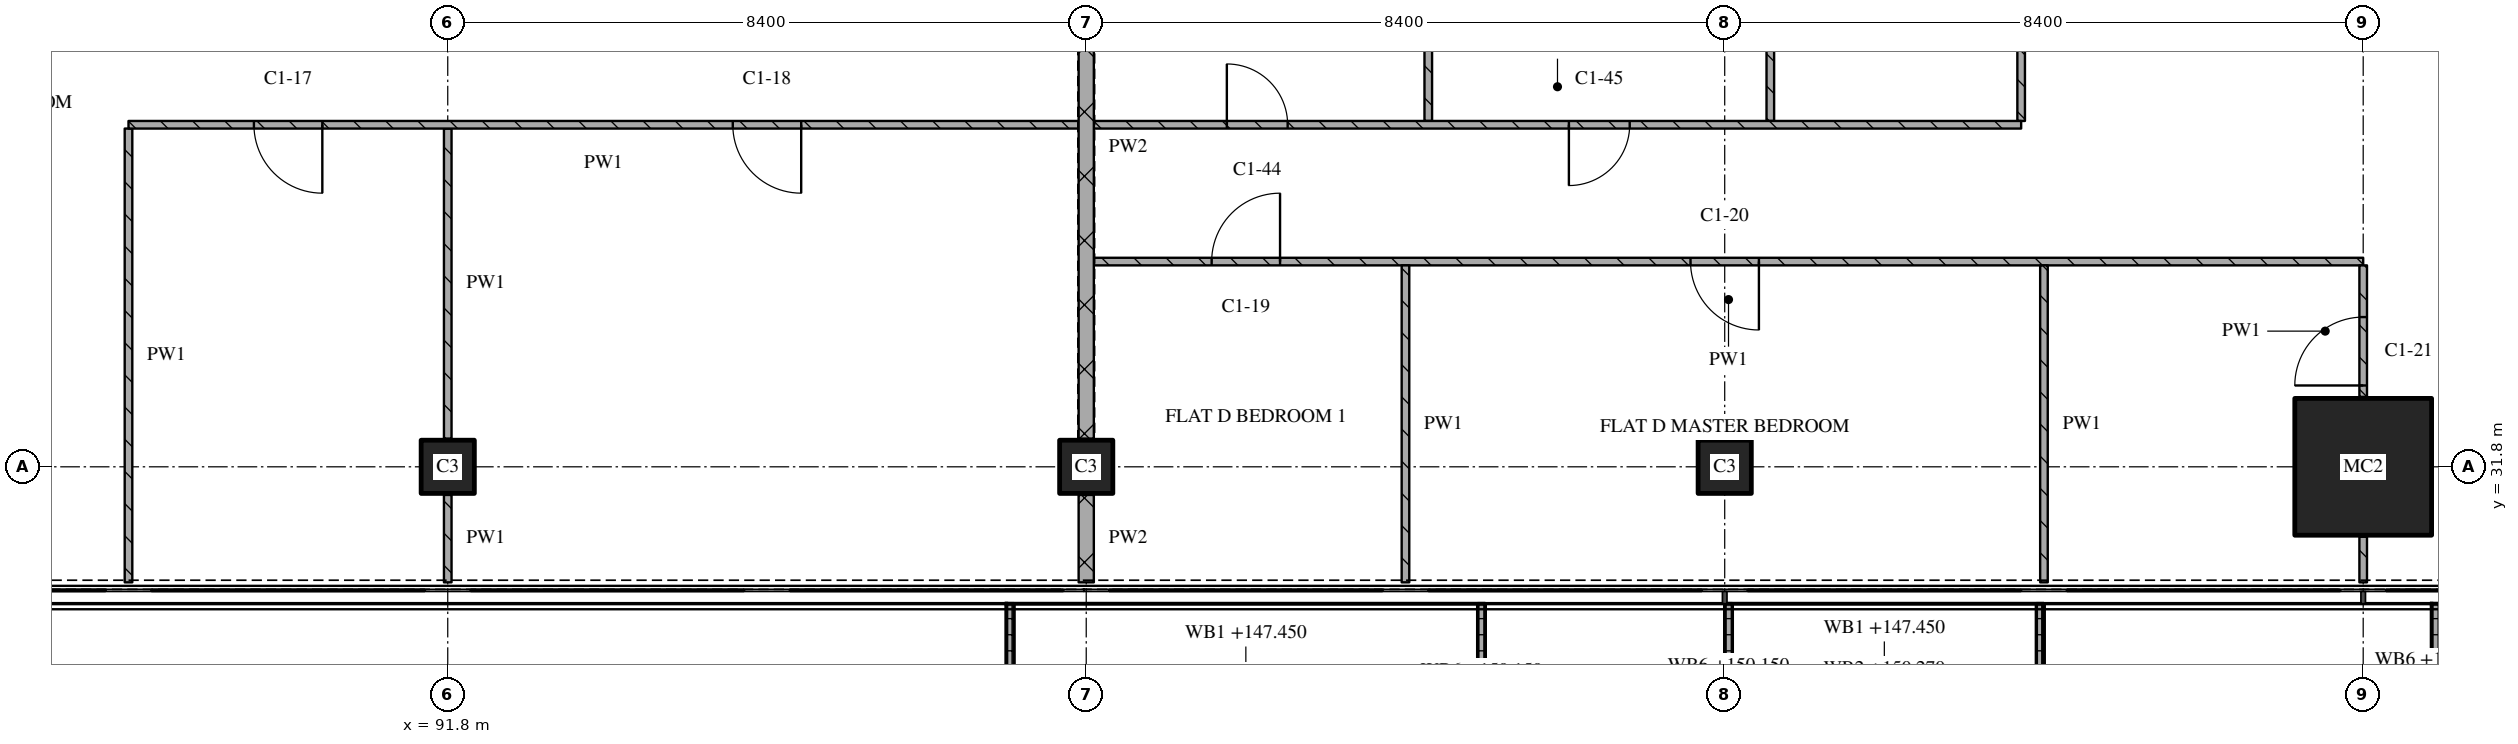
"""IFC4 building model, lengths in metres.
Left out: names, types, materials, properties, quantities, classifications, styles, units other than length and angle.
Written with IfcOpenShell. Run it as: python <this file> out.ifc"""

import sys

from ifc_helpers import new_model, si_unit, direction, frame, frame_2d, origin, origin_2d, place, context, subcontext, project, spatial, polyline, rectangle, outline, extrude, element, fill, save


model = new_model("IFC4")
c1 = context("Model", 3, precision=1e-05, world=origin(), true_north=direction((0.0, 1.0)))
c2 = subcontext(c1, "Body", "Model", "MODEL_VIEW")
j1 = project(units=[si_unit("LENGTHUNIT", "METRE"), si_unit("PLANEANGLEUNIT", "RADIAN")], contexts=[c1])
p1 = place(None, origin())
s1 = spatial("IfcSite", under=j1, at=p1, CompositionType="ELEMENT")
p2 = place(p1, origin())
s2 = spatial("IfcBuilding", under=s1, at=p2, CompositionType="ELEMENT")
p3 = place(p2, frame((0.0, 0.0, 147.45)))
s3 = spatial("IfcBuildingStorey", under=s2, at=p3, CompositionType="ELEMENT", Elevation=147.45)
for number, where, z_axis, x_axis in (
    (1, (91.8, 31.8, 0.0), (0.0, 0.0, 1.0), (1.0, 0.0, 0.0)),
    (2, (100.2, 31.8, 0.0), (0.0, 0.0, 1.0), (1.0, 0.0, 0.0)),
    (3, (108.6, 31.8, 0.0), (0.0, 0.0, 1.0), (1.0, 0.0, 0.0)),
):
    element("IfcColumn", number, at=place(p3, frame(where, z_axis=z_axis, x_axis=x_axis)), inside=s3, PredefinedType="COLUMN", context=c2, shape_type="SweptSolid", body=[
        extrude(rectangle(XDim=0.7, YDim=0.7, at=origin_2d()), origin(), (0.0, 0.0, 1.0), 3.6),
    ])
p4 = place(p3, frame((117.0, 31.8, 0.0), z_axis=(0.0, 0.0, 1.0), x_axis=(1.0, 0.0, 0.0)))
e4 = element("IfcColumn", 4, at=p4, inside=s3, PredefinedType="COLUMN", context=c2, shape_type="SweptSolid", body=[
    extrude(rectangle(XDim=1.8, YDim=1.8, at=origin_2d()), origin(), (0.0, 0.0, 1.0), 3.6),
])
p5 = place(p3, origin())
e5 = element("IfcWall", 5, at=p5, inside=s3, PredefinedType="SOLIDWALL", context=c2, shape_type="SweptSolid", body=[
    extrude(outline(polyline([(99.15, 30.0), (99.25, 30.0), (99.25, 28.233), (105.35, 28.233), (105.35, 30.0), (105.45, 30.0), (105.45, 28.133), (99.15, 28.133), (99.15, 30.0)])), origin(), (0.0, 0.0, 1.0), 1.0),
])
p6 = place(p3, origin())
e6 = element("IfcWall", 6, at=p6, inside=s3, PredefinedType="SOLIDWALL", context=c2, shape_type="SweptSolid", body=[
    extrude(outline(polyline([(108.6, 30.0), (108.7, 30.0), (108.7, 28.367), (112.7, 28.367), (112.7, 30.0), (112.8, 30.0), (112.8, 28.267), (108.6, 28.267), (108.6, 30.0)])), origin(), (0.0, 0.0, 1.0), 1.0),
])
p7 = place(p3, origin())
e7 = element("IfcWall", 7, at=p7, inside=s3, PredefinedType="SOLIDWALL", context=c2, shape_type="SweptSolid", body=[
    extrude(outline(polyline([(117.9, 30.0), (118.0, 30.0), (118.0, 28.5), (120.2, 28.5), (120.2, 30.0), (120.3, 30.0), (120.3, 28.4), (117.9, 28.4), (117.9, 30.0)])), origin(), (0.0, 0.0, 1.0), 1.0),
])
p8 = place(p3, frame((117.0, 34.5, 0.0), z_axis=(0.0, 0.0, 1.0), x_axis=(-1.0, 0.0, 0.0)))
e8 = element("IfcWall", 8, at=p8, inside=s3, PredefinedType="PARTITIONING", context=c2, shape_type="SweptSolid", body=[
    extrude(rectangle(XDim=16.7, YDim=0.1, at=frame_2d((8.35, 0.0))), origin(), (0.0, 0.0, 1.0), 3.32),
])
p9 = place(p8, frame((7.95, 0.0, 0.0)))
e9 = element("IfcOpeningElement", 9, at=p9, cuts=e8, PredefinedType="OPENING", context=c2, shape_type="SweptSolid", body=[
    extrude(rectangle(XDim=0.9, YDim=2.1, at=frame_2d((0.45, 1.05))), frame((0.0, 0.06, 0.0), z_axis=(0.0, -1.0, 0.0), x_axis=(1.0, 0.0, 0.0)), (0.0, 0.0, 1.0), 0.12),
])
p10 = place(p8, frame((14.25, 0.0, 0.0)))
e10 = element("IfcOpeningElement", 10, at=p10, cuts=e8, PredefinedType="OPENING", context=c2, shape_type="SweptSolid", body=[
    extrude(rectangle(XDim=0.9, YDim=2.1, at=frame_2d((0.45, 1.05))), frame((0.0, 0.06, 0.0), z_axis=(0.0, -1.0, 0.0), x_axis=(1.0, 0.0, 0.0)), (0.0, 0.0, 1.0), 0.12),
])
p11 = place(p3, frame((87.6, 36.25, 0.0), z_axis=(0.0, 0.0, 1.0), x_axis=(0.0, -1.0, 0.0)))
e11 = element("IfcWall", 11, at=p11, inside=s3, PredefinedType="PARTITIONING", context=c2, shape_type="SweptSolid", body=[
    extrude(rectangle(XDim=5.97, YDim=0.1, at=frame_2d((2.985, 0.0))), origin(), (0.0, 0.0, 1.0), 3.32),
])
p12 = place(p3, frame((91.8, 31.43, 0.0), z_axis=(0.0, 0.0, 1.0), x_axis=(0.0, -1.0, 0.0)))
e12 = element("IfcWall", 12, at=p12, inside=s3, PredefinedType="PARTITIONING", context=c2, shape_type="SweptSolid", body=[
    extrude(rectangle(XDim=1.15, YDim=0.1, at=frame_2d((0.575, 0.0))), origin(), (0.0, 0.0, 1.0), 3.32),
])
p13 = place(p3, frame((91.8, 36.25, 0.0), z_axis=(0.0, 0.0, 1.0), x_axis=(0.0, -1.0, 0.0)))
e13 = element("IfcWall", 13, at=p13, inside=s3, PredefinedType="PARTITIONING", context=c2, shape_type="SweptSolid", body=[
    extrude(rectangle(XDim=4.08, YDim=0.1, at=frame_2d((2.04, 0.0))), origin(), (0.0, 0.0, 1.0), 3.32),
])
p14 = place(p3, frame((100.2, 31.43, 0.0), z_axis=(0.0, 0.0, 1.0), x_axis=(0.0, -1.0, 0.0)))
e14 = element("IfcWall", 14, at=p14, inside=s3, PredefinedType="PARTITIONING", context=c2, shape_type="SweptSolid", body=[
    extrude(rectangle(XDim=1.15, YDim=0.2, at=frame_2d((0.575, 0.0))), origin(), (0.0, 0.0, 1.0), 3.32),
])
p15 = place(p3, frame((100.2, 39.83, 0.0), z_axis=(0.0, 0.0, 1.0), x_axis=(0.0, -1.0, 0.0)))
e15 = element("IfcWall", 15, at=p15, inside=s3, PredefinedType="PARTITIONING", context=c2, shape_type="SweptSolid", body=[
    extrude(rectangle(XDim=7.66, YDim=0.2, at=frame_2d((3.83, 0.0))), origin(), (0.0, 0.0, 1.0), 2.72),
])
p16 = place(p3, frame((104.4, 34.45, 0.0), z_axis=(0.0, 0.0, 1.0), x_axis=(0.0, -1.0, 0.0)))
e16 = element("IfcWall", 16, at=p16, inside=s3, PredefinedType="PARTITIONING", context=c2, shape_type="SweptSolid", body=[
    extrude(rectangle(XDim=4.17, YDim=0.1, at=frame_2d((2.085, 0.0))), origin(), (0.0, 0.0, 1.0), 3.32),
])
for number, where, z_axis, x_axis in (
    (17, (104.7, 40.7, 0.0), (0.0, 0.0, 1.0), (0.0, -1.0, 0.0)),
    (18, (109.2, 40.7, 0.0), (0.0, 0.0, 1.0), (0.0, -1.0, 0.0)),
):
    element("IfcWall", number, at=place(p3, frame(where, z_axis=z_axis, x_axis=x_axis)), inside=s3, PredefinedType="PARTITIONING", context=c2, shape_type="SweptSolid", body=[
        extrude(rectangle(XDim=4.35, YDim=0.1, at=frame_2d((2.175, 0.0))), origin(), (0.0, 0.0, 1.0), 3.32),
    ])
p17 = place(p3, frame((112.5, 36.35, 0.0), z_axis=(0.0, 0.0, 1.0), x_axis=(0.0, 1.0, 0.0)))
e19 = element("IfcWall", 19, at=p17, inside=s3, PredefinedType="PARTITIONING", context=c2, shape_type="SweptSolid", body=[
    extrude(rectangle(XDim=4.35, YDim=0.1, at=frame_2d((2.175, 0.0))), origin(), (0.0, 0.0, 1.0), 3.32),
])
p18 = place(p17, frame((1.75, 0.0, 0.0)))
e20 = element("IfcOpeningElement", 20, at=p18, cuts=e19, PredefinedType="OPENING", context=c2, shape_type="SweptSolid", body=[
    extrude(rectangle(XDim=0.9, YDim=2.1, at=frame_2d((0.45, 1.05))), frame((0.0, 0.06, 0.0), z_axis=(0.0, -1.0, 0.0), x_axis=(1.0, 0.0, 0.0)), (0.0, 0.0, 1.0), 0.12),
])
p19 = place(p3, frame((112.8, 34.45, 0.0), z_axis=(0.0, 0.0, 1.0), x_axis=(0.0, -1.0, 0.0)))
e21 = element("IfcWall", 21, at=p19, inside=s3, PredefinedType="PARTITIONING", context=c2, shape_type="SweptSolid", body=[
    extrude(rectangle(XDim=4.17, YDim=0.1, at=frame_2d((2.085, 0.0))), origin(), (0.0, 0.0, 1.0), 3.32),
])
p20 = place(p3, frame((117.0, 30.88, 0.0), z_axis=(0.0, 0.0, 1.0), x_axis=(0.0, -1.0, 0.0)))
e22 = element("IfcWall", 22, at=p20, inside=s3, PredefinedType="PARTITIONING", context=c2, shape_type="SweptSolid", body=[
    extrude(rectangle(XDim=0.6, YDim=0.1, at=frame_2d((0.3, 0.0))), origin(), (0.0, 0.0, 1.0), 3.32),
])
p21 = place(p3, frame((117.0, 32.72, 0.0), z_axis=(0.0, 0.0, 1.0), x_axis=(0.0, 1.0, 0.0)))
e23 = element("IfcWall", 23, at=p21, inside=s3, PredefinedType="PARTITIONING", context=c2, shape_type="SweptSolid", body=[
    extrude(rectangle(XDim=1.73, YDim=0.1, at=frame_2d((0.865, 0.0))), origin(), (0.0, 0.0, 1.0), 3.32),
])
p22 = place(p21, frame((0.15, 0.0, 0.0)))
e24 = element("IfcOpeningElement", 24, at=p22, cuts=e23, PredefinedType="OPENING", context=c2, shape_type="SweptSolid", body=[
    extrude(rectangle(XDim=0.9, YDim=2.1, at=frame_2d((0.45, 1.05))), frame((0.0, 0.06, 0.0), z_axis=(0.0, -1.0, 0.0), x_axis=(1.0, 0.0, 0.0)), (0.0, 0.0, 1.0), 0.12),
])
p23 = place(p3, frame((100.1, 36.3, 0.0), z_axis=(0.0, 0.0, 1.0), x_axis=(-1.0, 0.0, 0.0)))
e25 = element("IfcWall", 25, at=p23, inside=s3, PredefinedType="PARTITIONING", context=c2, shape_type="SweptSolid", body=[
    extrude(rectangle(XDim=12.5, YDim=0.1, at=frame_2d((6.25, 0.0))), origin(), (0.0, 0.0, 1.0), 3.32),
])
p24 = place(p23, frame((3.65, 0.0, 0.0)))
e26 = element("IfcOpeningElement", 26, at=p24, cuts=e25, PredefinedType="OPENING", context=c2, shape_type="SweptSolid", body=[
    extrude(rectangle(XDim=0.9, YDim=2.1, at=frame_2d((0.45, 1.05))), frame((0.0, 0.06, 0.0), z_axis=(0.0, -1.0, 0.0), x_axis=(1.0, 0.0, 0.0)), (0.0, 0.0, 1.0), 0.12),
])
p25 = place(p23, frame((9.95, 0.0, 0.0)))
e27 = element("IfcOpeningElement", 27, at=p25, cuts=e25, PredefinedType="OPENING", context=c2, shape_type="SweptSolid", body=[
    extrude(rectangle(XDim=0.9, YDim=2.1, at=frame_2d((0.45, 1.05))), frame((0.0, 0.06, 0.0), z_axis=(0.0, -1.0, 0.0), x_axis=(1.0, 0.0, 0.0)), (0.0, 0.0, 1.0), 0.12),
])
p26 = place(p3, frame((100.3, 36.3, 0.0), z_axis=(0.0, 0.0, 1.0), x_axis=(1.0, 0.0, 0.0)))
e28 = element("IfcWall", 28, at=p26, inside=s3, PredefinedType="PARTITIONING", context=c2, shape_type="SweptSolid", body=[
    extrude(rectangle(XDim=12.2, YDim=0.1, at=frame_2d((6.1, 0.0))), origin(), (0.0, 0.0, 1.0), 3.32),
])
p27 = place(p26, frame((1.75, 0.0, 0.0)))
e29 = element("IfcOpeningElement", 29, at=p27, cuts=e28, PredefinedType="OPENING", context=c2, shape_type="SweptSolid", body=[
    extrude(rectangle(XDim=0.8, YDim=2.1, at=frame_2d((0.4, 1.05))), frame((0.0, 0.06, 0.0), z_axis=(0.0, -1.0, 0.0), x_axis=(1.0, 0.0, 0.0)), (0.0, 0.0, 1.0), 0.12),
])
p28 = place(p26, frame((6.25, 0.0, 0.0)))
e30 = element("IfcOpeningElement", 30, at=p28, cuts=e28, PredefinedType="OPENING", context=c2, shape_type="SweptSolid", body=[
    extrude(rectangle(XDim=0.8, YDim=2.1, at=frame_2d((0.4, 1.05))), frame((0.0, 0.06, 0.0), z_axis=(0.0, -1.0, 0.0), x_axis=(1.0, 0.0, 0.0)), (0.0, 0.0, 1.0), 0.12),
])
p29 = place(p9, origin())
e31 = element("IfcDoor", 31, at=p29, inside=s3, OperationType="SINGLE_SWING_LEFT", PredefinedType="DOOR", context=c2, shape_type="SweptSolid", body=[
    extrude(rectangle(XDim=0.9, YDim=2.1, at=frame_2d((0.45, 1.05))), frame((0.0, 0.025, 0.0), z_axis=(0.0, -1.0, 0.0), x_axis=(1.0, 0.0, 0.0)), (0.0, 0.0, 1.0), 0.05),
])
fill(e9, e31)
p30 = place(p10, origin())
e32 = element("IfcDoor", 32, at=p30, inside=s3, OperationType="SINGLE_SWING_RIGHT", PredefinedType="DOOR", context=c2, shape_type="SweptSolid", body=[
    extrude(rectangle(XDim=0.9, YDim=2.1, at=frame_2d((0.45, 1.05))), frame((0.0, 0.025, 0.0), z_axis=(0.0, -1.0, 0.0), x_axis=(1.0, 0.0, 0.0)), (0.0, 0.0, 1.0), 0.05),
])
fill(e10, e32)
p31 = place(p22, origin())
e33 = element("IfcDoor", 33, at=p31, inside=s3, OperationType="SINGLE_SWING_LEFT", PredefinedType="DOOR", context=c2, shape_type="SweptSolid", body=[
    extrude(rectangle(XDim=0.9, YDim=2.1, at=frame_2d((0.45, 1.05))), frame((0.0, 0.025, 0.0), z_axis=(0.0, -1.0, 0.0), x_axis=(1.0, 0.0, 0.0)), (0.0, 0.0, 1.0), 0.05),
])
fill(e24, e33)
p32 = place(p24, origin())
e34 = element("IfcDoor", 34, at=p32, inside=s3, OperationType="SINGLE_SWING_LEFT", PredefinedType="DOOR", context=c2, shape_type="SweptSolid", body=[
    extrude(rectangle(XDim=0.9, YDim=2.1, at=frame_2d((0.45, 1.05))), frame((0.0, 0.025, 0.0), z_axis=(0.0, -1.0, 0.0), x_axis=(1.0, 0.0, 0.0)), (0.0, 0.0, 1.0), 0.05),
])
fill(e26, e34)
p33 = place(p25, origin())
e35 = element("IfcDoor", 35, at=p33, inside=s3, OperationType="SINGLE_SWING_LEFT", PredefinedType="DOOR", context=c2, shape_type="SweptSolid", body=[
    extrude(rectangle(XDim=0.9, YDim=2.1, at=frame_2d((0.45, 1.05))), frame((0.0, 0.025, 0.0), z_axis=(0.0, -1.0, 0.0), x_axis=(1.0, 0.0, 0.0)), (0.0, 0.0, 1.0), 0.05),
])
fill(e27, e35)
p34 = place(p27, origin())
e36 = element("IfcDoor", 36, at=p34, inside=s3, OperationType="SINGLE_SWING_LEFT", PredefinedType="DOOR", context=c2, shape_type="SweptSolid", body=[
    extrude(rectangle(XDim=0.8, YDim=2.1, at=frame_2d((0.4, 1.05))), frame((0.0, 0.025, 0.0), z_axis=(0.0, -1.0, 0.0), x_axis=(1.0, 0.0, 0.0)), (0.0, 0.0, 1.0), 0.05),
])
fill(e29, e36)
p35 = place(p28, origin())
e37 = element("IfcDoor", 37, at=p35, inside=s3, OperationType="SINGLE_SWING_RIGHT", PredefinedType="DOOR", context=c2, shape_type="SweptSolid", body=[
    extrude(rectangle(XDim=0.8, YDim=2.1, at=frame_2d((0.4, 1.05))), frame((0.0, 0.025, 0.0), z_axis=(0.0, -1.0, 0.0), x_axis=(1.0, 0.0, 0.0)), (0.0, 0.0, 1.0), 0.05),
])
fill(e30, e37)
save(model, sys.argv[1])
